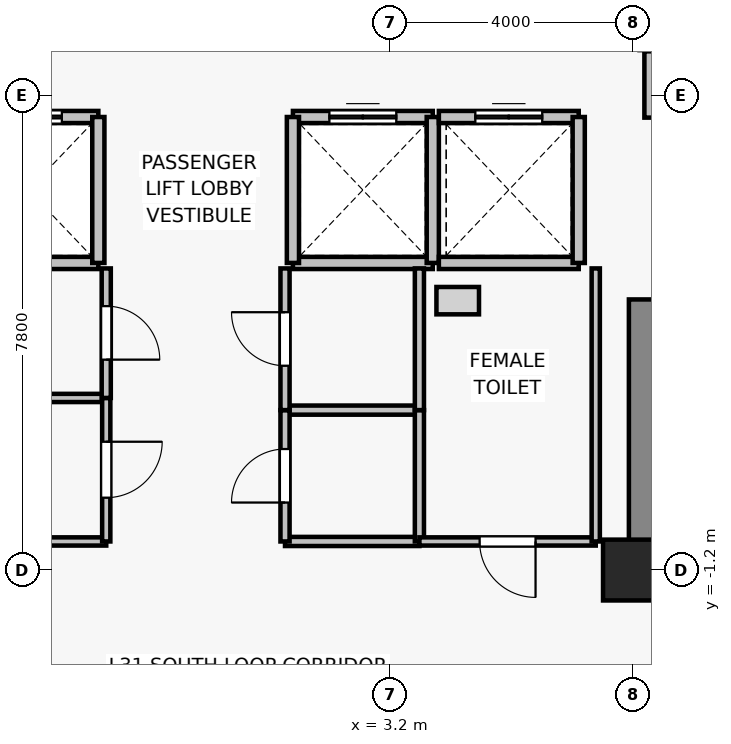
"""IFC4 building model, lengths in metres.
Left out: names, types, materials, properties, quantities, classifications, styles, units other than length and angle.
Written with IfcOpenShell. Run it as: python <this file> out.ifc"""

import sys

from ifc_helpers import new_model, si_unit, direction, frame, frame_2d, origin, origin_2d, place, context, subcontext, project, spatial, rectangle, extrude, source, transform, mapped, element, fill, save


model = new_model("IFC4")
c1 = context("Model", 3, precision=1e-05, world=origin(), true_north=direction((0.0, 1.0)))
c2 = subcontext(c1, "Body", "Model", "MODEL_VIEW")
j1 = project(units=[si_unit("LENGTHUNIT", "METRE"), si_unit("PLANEANGLEUNIT", "RADIAN")], contexts=[c1])
p1 = place(None, origin())
s1 = spatial("IfcSite", under=j1, at=p1, CompositionType="ELEMENT")
p2 = place(p1, origin())
s2 = spatial("IfcBuilding", under=s1, at=p2, CompositionType="ELEMENT")
p3 = place(p2, frame((0.0, 0.0, 113.2)))
s3 = spatial("IfcBuildingStorey", under=s2, at=p3, CompositionType="ELEMENT", Elevation=113.2)
p4 = place(p3, frame((7.2, -1.2, 0.0), z_axis=(0.0, 0.0, 1.0), x_axis=(1.0, 0.0, 0.0)))
e1 = element("IfcColumn", 1, at=p4, inside=s3, PredefinedType="COLUMN", context=c2, shape_type="SweptSolid", body=[
    extrude(rectangle(XDim=1.0, YDim=1.0, at=origin_2d()), origin(), (0.0, 0.0, 1.0), 3.3),
])
p5 = place(p3, frame((7.4, -0.825, 0.0), z_axis=(0.0, 0.0, 1.0), x_axis=(0.0, 1.0, 0.0)))
e2 = element("IfcWall", 2, at=p5, inside=s3, PredefinedType="SHEAR", context=c2, shape_type="SweptSolid", body=[
    extrude(rectangle(XDim=4.075, YDim=0.55, at=frame_2d((2.038, 0.0))), origin(), (0.0, 0.0, 1.0), 3.075),
])
p6 = place(p3, frame((-1.6, 3.85, 0.0), z_axis=(0.0, 0.0, 1.0), x_axis=(-1.0, 0.0, 0.0)))
e3 = element("IfcWall", 3, at=p6, inside=s3, PredefinedType="SOLIDWALL", context=c2, shape_type="SweptSolid", body=[
    extrude(rectangle(XDim=2.3, YDim=0.2, at=frame_2d((1.15, 0.0))), origin(), (0.0, 0.0, 1.0), 3.075),
])
p7 = place(p3, frame((-3.9, 6.25, 0.0), z_axis=(0.0, 0.0, 1.0), x_axis=(1.0, 0.0, 0.0)))
e4 = element("IfcWall", 4, at=p7, inside=s3, PredefinedType="SOLIDWALL", context=c2, shape_type="SweptSolid", body=[
    extrude(rectangle(XDim=2.3, YDim=0.2, at=frame_2d((1.15, 0.0))), origin(), (0.0, 0.0, 1.0), 3.075),
])
p8 = place(p7, frame((0.6, 0.0, 0.0)))
e5 = element("IfcOpeningElement", 5, at=p8, cuts=e4, PredefinedType="OPENING", context=c2, shape_type="SweptSolid", body=[
    extrude(rectangle(XDim=1.1, YDim=2.2, at=frame_2d((0.55, 1.1))), frame((0.0, 0.11, 0.0), z_axis=(0.0, -1.0, 0.0), x_axis=(1.0, 0.0, 0.0)), (0.0, 0.0, 1.0), 0.22),
])
p9 = place(p3, frame((-1.6, 6.25, 0.0), z_axis=(0.0, 0.0, 1.0), x_axis=(0.0, -1.0, 0.0)))
e6 = element("IfcWall", 6, at=p9, inside=s3, PredefinedType="SOLIDWALL", context=c2, shape_type="SweptSolid", body=[
    extrude(rectangle(XDim=2.4, YDim=0.2, at=frame_2d((1.2, 0.0))), origin(), (0.0, 0.0, 1.0), 3.075),
])
p10 = place(p3, frame((3.9, 3.85, 0.0), z_axis=(0.0, 0.0, 1.0), x_axis=(-1.0, 0.0, 0.0)))
e7 = element("IfcWall", 7, at=p10, inside=s3, PredefinedType="SOLIDWALL", context=c2, shape_type="SweptSolid", body=[
    extrude(rectangle(XDim=2.3, YDim=0.2, at=frame_2d((1.15, 0.0))), origin(), (0.0, 0.0, 1.0), 3.075),
])
p11 = place(p3, frame((1.6, 6.25, 0.0), z_axis=(0.0, 0.0, 1.0), x_axis=(1.0, 0.0, 0.0)))
e8 = element("IfcWall", 8, at=p11, inside=s3, PredefinedType="SOLIDWALL", context=c2, shape_type="SweptSolid", body=[
    extrude(rectangle(XDim=2.3, YDim=0.2, at=frame_2d((1.15, 0.0))), origin(), (0.0, 0.0, 1.0), 3.075),
])
p12 = place(p11, frame((0.6, 0.0, 0.0)))
e9 = element("IfcOpeningElement", 9, at=p12, cuts=e8, PredefinedType="OPENING", context=c2, shape_type="SweptSolid", body=[
    extrude(rectangle(XDim=1.1, YDim=2.2, at=frame_2d((0.55, 1.1))), frame((0.0, 0.11, 0.0), z_axis=(0.0, -1.0, 0.0), x_axis=(1.0, 0.0, 0.0)), (0.0, 0.0, 1.0), 0.22),
])
for number, where, z_axis, x_axis in (
    (10, (1.6, 3.85, 0.0), (0.0, 0.0, 1.0), (0.0, 1.0, 0.0)),
    (11, (3.9, 6.25, 0.0), (0.0, 0.0, 1.0), (0.0, -1.0, 0.0)),
):
    element("IfcWall", number, at=place(p3, frame(where, z_axis=z_axis, x_axis=x_axis)), inside=s3, PredefinedType="SOLIDWALL", context=c2, shape_type="SweptSolid", body=[
        extrude(rectangle(XDim=2.4, YDim=0.2, at=frame_2d((1.2, 0.0))), origin(), (0.0, 0.0, 1.0), 3.075),
    ])
p13 = place(p3, frame((6.3, 3.85, 0.0), z_axis=(0.0, 0.0, 1.0), x_axis=(-1.0, 0.0, 0.0)))
e12 = element("IfcWall", 12, at=p13, inside=s3, PredefinedType="SOLIDWALL", context=c2, shape_type="SweptSolid", body=[
    extrude(rectangle(XDim=2.3, YDim=0.2, at=frame_2d((1.15, 0.0))), origin(), (0.0, 0.0, 1.0), 3.075),
])
p14 = place(p3, frame((4.0, 6.25, 0.0), z_axis=(0.0, 0.0, 1.0), x_axis=(1.0, 0.0, 0.0)))
e13 = element("IfcWall", 13, at=p14, inside=s3, PredefinedType="SOLIDWALL", context=c2, shape_type="SweptSolid", body=[
    extrude(rectangle(XDim=2.3, YDim=0.2, at=frame_2d((1.15, 0.0))), origin(), (0.0, 0.0, 1.0), 3.075),
])
p15 = place(p14, frame((0.6, 0.0, 0.0)))
e14 = element("IfcOpeningElement", 14, at=p15, cuts=e13, PredefinedType="OPENING", context=c2, shape_type="SweptSolid", body=[
    extrude(rectangle(XDim=1.1, YDim=2.2, at=frame_2d((0.55, 1.1))), frame((0.0, 0.11, 0.0), z_axis=(0.0, -1.0, 0.0), x_axis=(1.0, 0.0, 0.0)), (0.0, 0.0, 1.0), 0.22),
])
p16 = place(p3, frame((6.3, 6.25, 0.0), z_axis=(0.0, 0.0, 1.0), x_axis=(0.0, -1.0, 0.0)))
e15 = element("IfcWall", 15, at=p16, inside=s3, PredefinedType="SOLIDWALL", context=c2, shape_type="SweptSolid", body=[
    extrude(rectangle(XDim=2.4, YDim=0.2, at=frame_2d((1.2, 0.0))), origin(), (0.0, 0.0, 1.0), 3.075),
])
p17 = place(p3, frame((9.6, 7.35, 0.0), z_axis=(0.0, 0.0, 1.0), x_axis=(-1.0, 0.0, 0.0)))
e16 = element("IfcWall", 16, at=p17, inside=s3, PredefinedType="SOLIDWALL", context=c2, shape_type="SweptSolid", body=[
    extrude(rectangle(XDim=2.2, YDim=0.2, at=frame_2d((1.1, 0.0))), origin(), (0.0, 0.0, 1.0), 2.515),
])
p18 = place(p3, frame((7.47, 6.24, 0.0), z_axis=(0.0, 0.0, 1.0), x_axis=(0.0, 1.0, 0.0)))
e17 = element("IfcWall", 17, at=p18, inside=s3, PredefinedType="PARTITIONING", context=c2, shape_type="SweptSolid", body=[
    extrude(rectangle(XDim=1.09, YDim=0.18, at=frame_2d((0.545, 0.0))), origin(), (0.0, 0.0, 1.0), 2.515),
])
for number, where, z_axis, x_axis in (
    (18, (-1.47, -0.73, 0.0), (0.0, 0.0, 1.0), (-1.0, 0.0, 0.0)),
    (19, (-3.47, 1.63, 0.0), (0.0, 0.0, 1.0), (1.0, 0.0, 0.0)),
):
    element("IfcWall", number, at=place(p3, frame(where, z_axis=z_axis, x_axis=x_axis)), inside=s3, PredefinedType="PARTITIONING", context=c2, shape_type="SweptSolid", body=[
        extrude(rectangle(XDim=2.0, YDim=0.135, at=frame_2d((1.0, 0.0))), origin(), (0.0, 0.0, 1.0), 3.075),
    ])
p19 = place(p3, frame((-1.47, 1.63, 0.0), z_axis=(0.0, 0.0, 1.0), x_axis=(0.0, -1.0, 0.0)))
e20 = element("IfcWall", 20, at=p19, inside=s3, PredefinedType="PARTITIONING", context=c2, shape_type="SweptSolid", body=[
    extrude(rectangle(XDim=2.36, YDim=0.135, at=frame_2d((1.18, 0.0))), origin(), (0.0, 0.0, 1.0), 3.075),
])
p20 = place(p19, frame((0.72, 0.0, 0.0)))
e21 = element("IfcOpeningElement", 21, at=p20, cuts=e20, PredefinedType="OPENING", context=c2, shape_type="SweptSolid", body=[
    extrude(rectangle(XDim=0.92, YDim=2.1, at=frame_2d((0.46, 1.05))), frame((0.0, 0.077, 0.0), z_axis=(0.0, -1.0, 0.0), x_axis=(1.0, 0.0, 0.0)), (0.0, 0.0, 1.0), 0.155),
])
p21 = place(p3, frame((-1.47, 3.76, 0.0), z_axis=(0.0, 0.0, 1.0), x_axis=(0.0, -1.0, 0.0)))
e22 = element("IfcWall", 22, at=p21, inside=s3, PredefinedType="PARTITIONING", context=c2, shape_type="SweptSolid", body=[
    extrude(rectangle(XDim=2.13, YDim=0.15, at=frame_2d((1.065, 0.0))), origin(), (0.0, 0.0, 1.0), 3.075),
])
p22 = place(p21, frame((0.62, 0.0, 0.0)))
e23 = element("IfcOpeningElement", 23, at=p22, cuts=e22, PredefinedType="OPENING", context=c2, shape_type="SweptSolid", body=[
    extrude(rectangle(XDim=0.88, YDim=2.1, at=frame_2d((0.44, 1.05))), frame((0.0, 0.085, 0.0), z_axis=(0.0, -1.0, 0.0), x_axis=(1.0, 0.0, 0.0)), (0.0, 0.0, 1.0), 0.17),
])
for number, where, z_axis, x_axis in (
    (24, (3.68, -0.73, 0.0), (0.0, 0.0, 1.0), (-1.0, 0.0, 0.0)),
    (25, (1.47, 1.43, 0.0), (0.0, 0.0, 1.0), (1.0, 0.0, 0.0)),
):
    element("IfcWall", number, at=place(p3, frame(where, z_axis=z_axis, x_axis=x_axis)), inside=s3, PredefinedType="PARTITIONING", context=c2, shape_type="SweptSolid", body=[
        extrude(rectangle(XDim=2.21, YDim=0.15, at=frame_2d((1.105, 0.0))), origin(), (0.0, 0.0, 1.0), 3.075),
    ])
p23 = place(p3, frame((1.47, -0.73, 0.0), z_axis=(0.0, 0.0, 1.0), x_axis=(0.0, 1.0, 0.0)))
e26 = element("IfcWall", 26, at=p23, inside=s3, PredefinedType="PARTITIONING", context=c2, shape_type="SweptSolid", body=[
    extrude(rectangle(XDim=2.16, YDim=0.15, at=frame_2d((1.08, 0.0))), origin(), (0.0, 0.0, 1.0), 3.075),
])
p24 = place(p23, frame((0.64, 0.0, 0.0)))
e27 = element("IfcOpeningElement", 27, at=p24, cuts=e26, PredefinedType="OPENING", context=c2, shape_type="SweptSolid", body=[
    extrude(rectangle(XDim=0.88, YDim=2.1, at=frame_2d((0.44, 1.05))), frame((0.0, 0.085, 0.0), z_axis=(0.0, -1.0, 0.0), x_axis=(1.0, 0.0, 0.0)), (0.0, 0.0, 1.0), 0.17),
])
p25 = place(p3, frame((3.68, 1.43, 0.0), z_axis=(0.0, 0.0, 1.0), x_axis=(0.0, -1.0, 0.0)))
e28 = element("IfcWall", 28, at=p25, inside=s3, PredefinedType="PARTITIONING", context=c2, shape_type="SweptSolid", body=[
    extrude(rectangle(XDim=2.16, YDim=0.15, at=frame_2d((1.08, 0.0))), origin(), (0.0, 0.0, 1.0), 3.075),
])
p26 = place(p3, frame((1.47, 1.43, 0.0), z_axis=(0.0, 0.0, 1.0), x_axis=(0.0, 1.0, 0.0)))
e29 = element("IfcWall", 29, at=p26, inside=s3, PredefinedType="PARTITIONING", context=c2, shape_type="SweptSolid", body=[
    extrude(rectangle(XDim=2.33, YDim=0.15, at=frame_2d((1.165, 0.0))), origin(), (0.0, 0.0, 1.0), 3.075),
])
p27 = place(p26, frame((0.73, 0.0, 0.0)))
e30 = element("IfcOpeningElement", 30, at=p27, cuts=e29, PredefinedType="OPENING", context=c2, shape_type="SweptSolid", body=[
    extrude(rectangle(XDim=0.88, YDim=2.15, at=frame_2d((0.44, 1.075))), frame((0.0, 0.085, 0.0), z_axis=(0.0, -1.0, 0.0), x_axis=(1.0, 0.0, 0.0)), (0.0, 0.0, 1.0), 0.17),
])
p28 = place(p3, frame((3.68, 3.76, 0.0), z_axis=(0.0, 0.0, 1.0), x_axis=(0.0, -1.0, 0.0)))
e31 = element("IfcWall", 31, at=p28, inside=s3, PredefinedType="PARTITIONING", context=c2, shape_type="SweptSolid", body=[
    extrude(rectangle(XDim=2.33, YDim=0.15, at=frame_2d((1.165, 0.0))), origin(), (0.0, 0.0, 1.0), 3.075),
])
p29 = place(p3, frame((6.58, -0.73, 0.0), z_axis=(0.0, 0.0, 1.0), x_axis=(-1.0, 0.0, 0.0)))
e32 = element("IfcWall", 32, at=p29, inside=s3, PredefinedType="PARTITIONING", context=c2, shape_type="SweptSolid", body=[
    extrude(rectangle(XDim=2.9, YDim=0.135, at=frame_2d((1.45, 0.0))), origin(), (0.0, 0.0, 1.0), 3.075),
])
p30 = place(p29, frame((0.99, 0.0, 0.0)))
e33 = element("IfcOpeningElement", 33, at=p30, cuts=e32, PredefinedType="OPENING", context=c2, shape_type="SweptSolid", body=[
    extrude(rectangle(XDim=0.92, YDim=2.1, at=frame_2d((0.46, 1.05))), frame((0.0, 0.077, 0.0), z_axis=(0.0, -1.0, 0.0), x_axis=(1.0, 0.0, 0.0)), (0.0, 0.0, 1.0), 0.155),
])
p31 = place(p3, frame((6.58, 3.76, 0.0), z_axis=(0.0, 0.0, 1.0), x_axis=(0.0, -1.0, 0.0)))
e34 = element("IfcWall", 34, at=p31, inside=s3, PredefinedType="PARTITIONING", context=c2, shape_type="SweptSolid", body=[
    extrude(rectangle(XDim=4.49, YDim=0.135, at=frame_2d((2.245, 0.0))), origin(), (0.0, 0.0, 1.0), 3.075),
])
m1 = source(origin(), c2, "Body", "SweptSolid", [
    extrude(rectangle(XDim=1.1, YDim=2.2, at=frame_2d((0.55, 1.1))), frame((0.0, 0.025, 0.0), z_axis=(0.0, -1.0, 0.0), x_axis=(1.0, 0.0, 0.0)), (0.0, 0.0, 1.0), 0.05),
])
p32 = place(p8, origin())
e35 = element("IfcDoor", 35, at=p32, inside=s3, OperationType="DOUBLE_DOOR_SLIDING", PredefinedType="DOOR", context=c2, shape_type="MappedRepresentation", body=[
    mapped(m1, transform((0.0, 0.0, 0.0), x_axis=(1.0, 0.0, 0.0), y_axis=(0.0, 1.0, 0.0), z_axis=(0.0, 0.0, 1.0), scale=1.0)),
])
fill(e5, e35)
p33 = place(p12, origin())
e36 = element("IfcDoor", 36, at=p33, inside=s3, OperationType="DOUBLE_DOOR_SLIDING", PredefinedType="DOOR", context=c2, shape_type="MappedRepresentation", body=[
    mapped(m1, transform((0.0, 0.0, 0.0), x_axis=(1.0, 0.0, 0.0), y_axis=(0.0, 1.0, 0.0), z_axis=(0.0, 0.0, 1.0), scale=1.0)),
])
fill(e9, e36)
p34 = place(p15, origin())
e37 = element("IfcDoor", 37, at=p34, inside=s3, OperationType="DOUBLE_DOOR_SLIDING", PredefinedType="DOOR", context=c2, shape_type="MappedRepresentation", body=[
    mapped(m1, transform((0.0, 0.0, 0.0), x_axis=(1.0, 0.0, 0.0), y_axis=(0.0, 1.0, 0.0), z_axis=(0.0, 0.0, 1.0), scale=1.0)),
])
fill(e14, e37)
m2 = source(origin(), c2, "Body", "SweptSolid", [
    extrude(rectangle(XDim=0.92, YDim=2.1, at=frame_2d((0.46, 1.05))), frame((0.0, 0.025, 0.0), z_axis=(0.0, -1.0, 0.0), x_axis=(1.0, 0.0, 0.0)), (0.0, 0.0, 1.0), 0.05),
])
p35 = place(p20, origin())
e38 = element("IfcDoor", 38, at=p35, inside=s3, OperationType="SINGLE_SWING_LEFT", PredefinedType="DOOR", context=c2, shape_type="MappedRepresentation", body=[
    mapped(m2, transform((0.0, 0.0, 0.0), x_axis=(1.0, 0.0, 0.0), y_axis=(0.0, 1.0, 0.0), z_axis=(0.0, 0.0, 1.0), scale=1.0)),
])
fill(e21, e38)
m3 = source(origin(), c2, "Body", "SweptSolid", [
    extrude(rectangle(XDim=0.88, YDim=2.1, at=frame_2d((0.44, 1.05))), frame((0.0, 0.025, 0.0), z_axis=(0.0, -1.0, 0.0), x_axis=(1.0, 0.0, 0.0)), (0.0, 0.0, 1.0), 0.05),
])
p36 = place(p22, origin())
e39 = element("IfcDoor", 39, at=p36, inside=s3, OperationType="SINGLE_SWING_RIGHT", PredefinedType="DOOR", context=c2, shape_type="MappedRepresentation", body=[
    mapped(m3, transform((0.0, 0.0, 0.0), x_axis=(1.0, 0.0, 0.0), y_axis=(0.0, 1.0, 0.0), z_axis=(0.0, 0.0, 1.0), scale=1.0)),
])
fill(e23, e39)
p37 = place(p24, origin())
e40 = element("IfcDoor", 40, at=p37, inside=s3, OperationType="SINGLE_SWING_LEFT", PredefinedType="DOOR", context=c2, shape_type="MappedRepresentation", body=[
    mapped(m3, transform((0.0, 0.0, 0.0), x_axis=(1.0, 0.0, 0.0), y_axis=(0.0, 1.0, 0.0), z_axis=(0.0, 0.0, 1.0), scale=1.0)),
])
fill(e27, e40)
m4 = source(origin(), c2, "Body", "SweptSolid", [
    extrude(rectangle(XDim=0.88, YDim=2.15, at=frame_2d((0.44, 1.075))), frame((0.0, 0.025, 0.0), z_axis=(0.0, -1.0, 0.0), x_axis=(1.0, 0.0, 0.0)), (0.0, 0.0, 1.0), 0.05),
])
p38 = place(p27, origin())
e41 = element("IfcDoor", 41, at=p38, inside=s3, OperationType="SINGLE_SWING_RIGHT", PredefinedType="DOOR", context=c2, shape_type="MappedRepresentation", body=[
    mapped(m4, transform((0.0, 0.0, 0.0), x_axis=(1.0, 0.0, 0.0), y_axis=(0.0, 1.0, 0.0), z_axis=(0.0, 0.0, 1.0), scale=1.0)),
])
fill(e30, e41)
p39 = place(p30, origin())
e42 = element("IfcDoor", 42, at=p39, inside=s3, OperationType="SINGLE_SWING_LEFT", PredefinedType="DOOR", context=c2, shape_type="MappedRepresentation", body=[
    mapped(m2, transform((0.0, 0.0, 0.0), x_axis=(1.0, 0.0, 0.0), y_axis=(0.0, 1.0, 0.0), z_axis=(0.0, 0.0, 1.0), scale=1.0)),
])
fill(e33, e42)
save(model, sys.argv[1])
